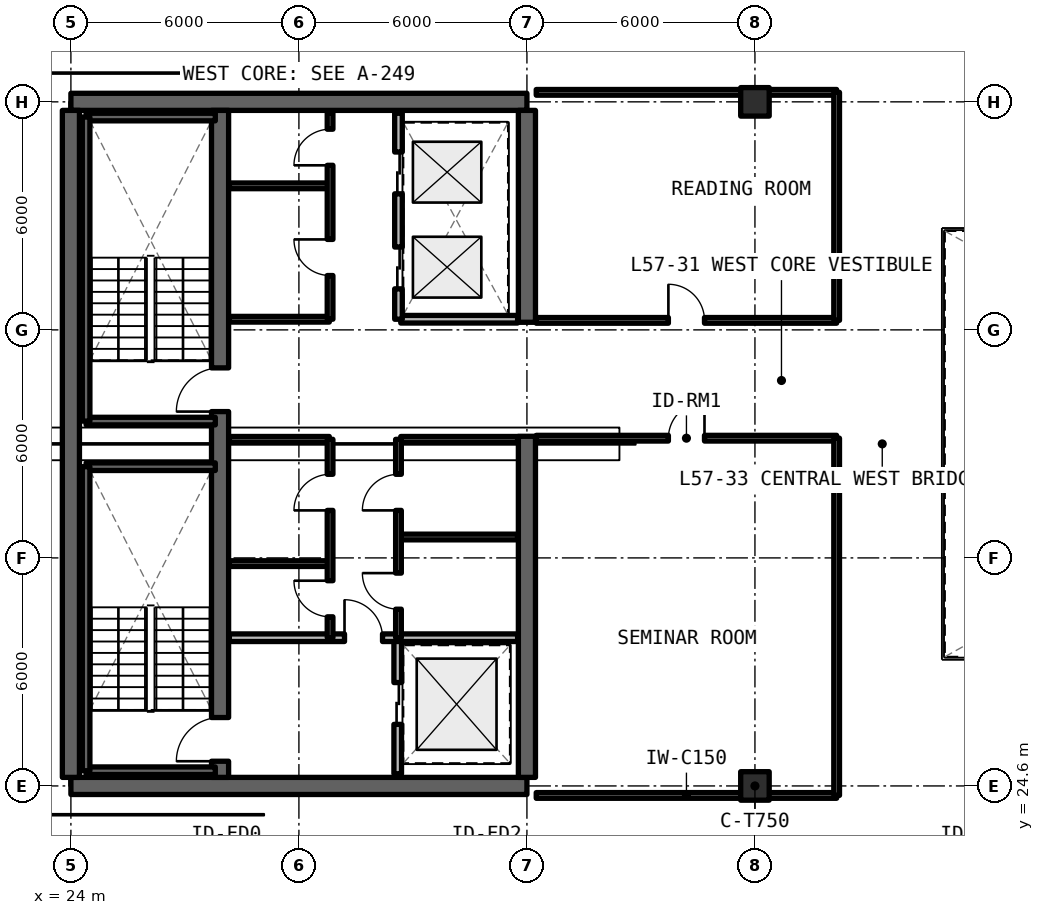
"""IFC4 building model, lengths in metres.
Left out: names, types, materials, properties, quantities, classifications, styles, units other than length and angle.
Written with IfcOpenShell. Run it as: python <this file> out.ifc"""

import sys

from ifc_helpers import new_model, si_unit, direction, frame, frame_2d, origin, origin_2d, place, context, subcontext, project, spatial, rectangle, extrude, element, fill, save


model = new_model("IFC4")
c1 = context("Model", 3, precision=1e-05, world=origin(), true_north=direction((0.0, 1.0)))
c2 = subcontext(c1, "Body", "Model", "MODEL_VIEW")
j1 = project(units=[si_unit("LENGTHUNIT", "METRE"), si_unit("PLANEANGLEUNIT", "RADIAN")], contexts=[c1])
p1 = place(None, origin())
s1 = spatial("IfcSite", under=j1, at=p1, CompositionType="ELEMENT")
p2 = place(p1, origin())
s2 = spatial("IfcBuilding", under=s1, at=p2, CompositionType="ELEMENT")
p3 = place(p2, frame((0.0, 0.0, 204.93)))
s3 = spatial("IfcBuildingStorey", under=s2, at=p3, CompositionType="ELEMENT", Elevation=204.93)
for number, where, z_axis, x_axis in (
    (1, (24.0, 24.6, 0.0), (0.0, 0.0, 1.0), (1.0, 0.0, 0.0)),
    (2, (36.0, 42.6, 0.0), (0.0, 0.0, 1.0), (-1.0, 0.0, 0.0)),
):
    element("IfcWall", number, at=place(p3, frame(where, z_axis=z_axis, x_axis=x_axis)), inside=s3, PredefinedType="SHEAR", context=c2, shape_type="SweptSolid", body=[
        extrude(rectangle(XDim=12.0, YDim=0.45, at=frame_2d((6.0, 0.0))), origin(), (0.0, 0.0, 1.0), 3.3),
    ])
p4 = place(p3, frame((24.0, 24.825, 0.0), z_axis=(0.0, 0.0, 1.0), x_axis=(0.0, 1.0, 0.0)))
e3 = element("IfcWall", 3, at=p4, inside=s3, PredefinedType="SHEAR", context=c2, shape_type="SweptSolid", body=[
    extrude(rectangle(XDim=17.55, YDim=0.45, at=frame_2d((8.775, 0.0))), origin(), (0.0, 0.0, 1.0), 3.3),
])
p5 = place(p3, frame((36.0, 24.825, 0.0), z_axis=(0.0, 0.0, 1.0), x_axis=(0.0, 1.0, 0.0)))
e4 = element("IfcWall", 4, at=p5, inside=s3, PredefinedType="SHEAR", context=c2, shape_type="SweptSolid", body=[
    extrude(rectangle(XDim=8.975, YDim=0.45, at=frame_2d((4.488, 0.0))), origin(), (0.0, 0.0, 1.0), 3.3),
])
p6 = place(p3, frame((36.0, 36.8, 0.0), z_axis=(0.0, 0.0, 1.0), x_axis=(0.0, 1.0, 0.0)))
e5 = element("IfcWall", 5, at=p6, inside=s3, PredefinedType="SHEAR", context=c2, shape_type="SweptSolid", body=[
    extrude(rectangle(XDim=5.575, YDim=0.45, at=frame_2d((2.788, 0.0))), origin(), (0.0, 0.0, 1.0), 3.3),
])
p7 = place(p3, frame((27.925, 24.825, 0.0), z_axis=(0.0, 0.0, 1.0), x_axis=(0.0, 1.0, 0.0)))
e6 = element("IfcWall", 6, at=p7, inside=s3, PredefinedType="SHEAR", context=c2, shape_type="SweptSolid", body=[
    extrude(rectangle(XDim=17.55, YDim=0.45, at=frame_2d((8.775, 0.0))), origin(), (0.0, 0.0, 1.0), 3.3),
])
p8 = place(p7, frame((0.425, 0.0, 0.0)))
e7 = element("IfcOpeningElement", 7, at=p8, cuts=e6, PredefinedType="OPENING", context=c2, shape_type="SweptSolid", body=[
    extrude(rectangle(XDim=1.15, YDim=2.15, at=frame_2d((0.575, 1.075))), frame((0.0, 0.235, 0.0), z_axis=(0.0, -1.0, 0.0), x_axis=(1.0, 0.0, 0.0)), (0.0, 0.0, 1.0), 0.47),
])
p9 = place(p7, frame((9.625, 0.0, 0.0)))
e8 = element("IfcOpeningElement", 8, at=p9, cuts=e6, PredefinedType="OPENING", context=c2, shape_type="SweptSolid", body=[
    extrude(rectangle(XDim=1.15, YDim=2.15, at=frame_2d((0.575, 1.075))), frame((0.0, 0.235, 0.0), z_axis=(0.0, -1.0, 0.0), x_axis=(1.0, 0.0, 0.0)), (0.0, 0.0, 1.0), 0.47),
])
for number, where, z_axis, x_axis in (
    (9, (42.0, 24.6, 0.0), (0.0, 0.0, 1.0), (1.0, 0.0, 0.0)),
    (10, (42.0, 42.6, 0.0), (0.0, 0.0, 1.0), (1.0, 0.0, 0.0)),
):
    element("IfcColumn", number, at=place(p3, frame(where, z_axis=z_axis, x_axis=x_axis)), inside=s3, PredefinedType="COLUMN", context=c2, shape_type="SweptSolid", body=[
        extrude(rectangle(XDim=0.75, YDim=0.75, at=origin_2d()), origin(), (0.0, 0.0, 1.0), 3.3),
    ])
p10 = place(p3, frame((32.6, 24.92, 0.0), z_axis=(0.0, 0.0, 1.0), x_axis=(0.0, 1.0, 0.0)))
e11 = element("IfcWall", 11, at=p10, inside=s3, PredefinedType="SOLIDWALL", context=c2, shape_type="SweptSolid", body=[
    extrude(rectangle(XDim=3.58, YDim=0.2, at=frame_2d((1.79, 0.0))), origin(), (0.0, 0.0, 1.0), 2.35),
])
p11 = place(p10, frame((1.3, 0.0, 0.0)))
e12 = element("IfcOpeningElement", 12, at=p11, cuts=e11, PredefinedType="OPENING", context=c2, shape_type="SweptSolid", body=[
    extrude(rectangle(XDim=1.1, YDim=2.2, at=frame_2d((0.55, 1.1))), frame((0.0, 0.11, 0.0), z_axis=(0.0, -1.0, 0.0), x_axis=(1.0, 0.0, 0.0)), (0.0, 0.0, 1.0), 0.22),
])
p12 = place(p3, frame((28.17, 28.5, 0.0), z_axis=(0.0, 0.0, 1.0), x_axis=(1.0, 0.0, 0.0)))
e13 = element("IfcWall", 13, at=p12, inside=s3, PredefinedType="SOLIDWALL", context=c2, shape_type="SweptSolid", body=[
    extrude(rectangle(XDim=7.585, YDim=0.2, at=frame_2d((3.792, 0.0))), origin(), (0.0, 0.0, 1.0), 2.35),
])
p13 = place(p12, frame((3.03, 0.0, 0.0)))
e14 = element("IfcOpeningElement", 14, at=p13, cuts=e13, PredefinedType="OPENING", context=c2, shape_type="SweptSolid", body=[
    extrude(rectangle(XDim=1.0, YDim=2.15, at=frame_2d((0.5, 1.075))), frame((0.0, 0.11, 0.0), z_axis=(0.0, -1.0, 0.0), x_axis=(1.0, 0.0, 0.0)), (0.0, 0.0, 1.0), 0.22),
])
for number, where, z_axis, x_axis in (
    (15, (28.17, 30.45, 0.0), (0.0, 0.0, 1.0), (1.0, 0.0, 0.0)),
    (16, (28.17, 33.72, 0.0), (0.0, 0.0, 1.0), (1.0, 0.0, 0.0)),
):
    element("IfcWall", number, at=place(p3, frame(where, z_axis=z_axis, x_axis=x_axis)), inside=s3, PredefinedType="SOLIDWALL", context=c2, shape_type="SweptSolid", body=[
        extrude(rectangle(XDim=2.63, YDim=0.15, at=frame_2d((1.315, 0.0))), origin(), (0.0, 0.0, 1.0), 2.35),
    ])
p14 = place(p3, frame((30.82, 28.5, 0.0), z_axis=(0.0, 0.0, 1.0), x_axis=(0.0, 1.0, 0.0)))
e17 = element("IfcWall", 17, at=p14, inside=s3, PredefinedType="SOLIDWALL", context=c2, shape_type="SweptSolid", body=[
    extrude(rectangle(XDim=5.22, YDim=0.15, at=frame_2d((2.61, 0.0))), origin(), (0.0, 0.0, 1.0), 2.35),
])
p15 = place(p14, frame((0.55, 0.0, 0.0)))
e18 = element("IfcOpeningElement", 18, at=p15, cuts=e17, PredefinedType="OPENING", context=c2, shape_type="SweptSolid", body=[
    extrude(rectangle(XDim=0.95, YDim=2.15, at=frame_2d((0.475, 1.075))), frame((0.0, 0.085, 0.0), z_axis=(0.0, -1.0, 0.0), x_axis=(1.0, 0.0, 0.0)), (0.0, 0.0, 1.0), 0.17),
])
p16 = place(p14, frame((3.35, 0.0, 0.0)))
e19 = element("IfcOpeningElement", 19, at=p16, cuts=e17, PredefinedType="OPENING", context=c2, shape_type="SweptSolid", body=[
    extrude(rectangle(XDim=0.95, YDim=2.15, at=frame_2d((0.475, 1.075))), frame((0.0, 0.085, 0.0), z_axis=(0.0, -1.0, 0.0), x_axis=(1.0, 0.0, 0.0)), (0.0, 0.0, 1.0), 0.17),
])
for number, where, z_axis, x_axis in (
    (20, (32.68, 31.15, 0.0), (0.0, 0.0, 1.0), (1.0, 0.0, 0.0)),
    (21, (32.68, 33.72, 0.0), (0.0, 0.0, 1.0), (1.0, 0.0, 0.0)),
):
    element("IfcWall", number, at=place(p3, frame(where, z_axis=z_axis, x_axis=x_axis)), inside=s3, PredefinedType="SOLIDWALL", context=c2, shape_type="SweptSolid", body=[
        extrude(rectangle(XDim=3.075, YDim=0.15, at=frame_2d((1.538, 0.0))), origin(), (0.0, 0.0, 1.0), 2.35),
    ])
p17 = place(p3, frame((32.62, 28.5, 0.0), z_axis=(0.0, 0.0, 1.0), x_axis=(0.0, 1.0, 0.0)))
e22 = element("IfcWall", 22, at=p17, inside=s3, PredefinedType="SOLIDWALL", context=c2, shape_type="SweptSolid", body=[
    extrude(rectangle(XDim=5.22, YDim=0.15, at=frame_2d((2.61, 0.0))), origin(), (0.0, 0.0, 1.0), 2.35),
])
p18 = place(p17, frame((0.75, 0.0, 0.0)))
e23 = element("IfcOpeningElement", 23, at=p18, cuts=e22, PredefinedType="OPENING", context=c2, shape_type="SweptSolid", body=[
    extrude(rectangle(XDim=0.95, YDim=2.15, at=frame_2d((0.475, 1.075))), frame((0.0, 0.085, 0.0), z_axis=(0.0, -1.0, 0.0), x_axis=(1.0, 0.0, 0.0)), (0.0, 0.0, 1.0), 0.17),
])
p19 = place(p17, frame((3.35, 0.0, 0.0)))
e24 = element("IfcOpeningElement", 24, at=p19, cuts=e22, PredefinedType="OPENING", context=c2, shape_type="SweptSolid", body=[
    extrude(rectangle(XDim=0.95, YDim=2.15, at=frame_2d((0.475, 1.075))), frame((0.0, 0.085, 0.0), z_axis=(0.0, -1.0, 0.0), x_axis=(1.0, 0.0, 0.0)), (0.0, 0.0, 1.0), 0.17),
])
for number, where, z_axis, x_axis in (
    (25, (28.17, 36.88, 0.0), (0.0, 0.0, 1.0), (1.0, 0.0, 0.0)),
    (26, (28.17, 40.39, 0.0), (0.0, 0.0, 1.0), (1.0, 0.0, 0.0)),
):
    element("IfcWall", number, at=place(p3, frame(where, z_axis=z_axis, x_axis=x_axis)), inside=s3, PredefinedType="SOLIDWALL", context=c2, shape_type="SweptSolid", body=[
        extrude(rectangle(XDim=2.63, YDim=0.15, at=frame_2d((1.315, 0.0))), origin(), (0.0, 0.0, 1.0), 2.35),
    ])
p20 = place(p3, frame((30.82, 36.88, 0.0), z_axis=(0.0, 0.0, 1.0), x_axis=(0.0, 1.0, 0.0)))
e27 = element("IfcWall", 27, at=p20, inside=s3, PredefinedType="SOLIDWALL", context=c2, shape_type="SweptSolid", body=[
    extrude(rectangle(XDim=5.42, YDim=0.15, at=frame_2d((2.71, 0.0))), origin(), (0.0, 0.0, 1.0), 2.35),
])
p21 = place(p20, frame((1.15, 0.0, 0.0)))
e28 = element("IfcOpeningElement", 28, at=p21, cuts=e27, PredefinedType="OPENING", context=c2, shape_type="SweptSolid", body=[
    extrude(rectangle(XDim=0.95, YDim=2.15, at=frame_2d((0.475, 1.075))), frame((0.0, 0.085, 0.0), z_axis=(0.0, -1.0, 0.0), x_axis=(1.0, 0.0, 0.0)), (0.0, 0.0, 1.0), 0.17),
])
p22 = place(p20, frame((4.05, 0.0, 0.0)))
e29 = element("IfcOpeningElement", 29, at=p22, cuts=e27, PredefinedType="OPENING", context=c2, shape_type="SweptSolid", body=[
    extrude(rectangle(XDim=0.95, YDim=2.15, at=frame_2d((0.475, 1.075))), frame((0.0, 0.085, 0.0), z_axis=(0.0, -1.0, 0.0), x_axis=(1.0, 0.0, 0.0)), (0.0, 0.0, 1.0), 0.17),
])
p23 = place(p3, frame((32.68, 36.88, 0.0), z_axis=(0.0, 0.0, 1.0), x_axis=(1.0, 0.0, 0.0)))
e30 = element("IfcWall", 30, at=p23, inside=s3, PredefinedType="SOLIDWALL", context=c2, shape_type="SweptSolid", body=[
    extrude(rectangle(XDim=3.075, YDim=0.2, at=frame_2d((1.538, 0.0))), origin(), (0.0, 0.0, 1.0), 2.35),
])
p24 = place(p3, frame((32.62, 36.88, 0.0), z_axis=(0.0, 0.0, 1.0), x_axis=(0.0, 1.0, 0.0)))
e31 = element("IfcWall", 31, at=p24, inside=s3, PredefinedType="SOLIDWALL", context=c2, shape_type="SweptSolid", body=[
    extrude(rectangle(XDim=5.42, YDim=0.2, at=frame_2d((2.71, 0.0))), origin(), (0.0, 0.0, 1.0), 2.35),
])
p25 = place(p24, frame((0.8, 0.0, 0.0)))
e32 = element("IfcOpeningElement", 32, at=p25, cuts=e31, PredefinedType="OPENING", context=c2, shape_type="SweptSolid", body=[
    extrude(rectangle(XDim=1.1, YDim=2.2, at=frame_2d((0.55, 1.1))), frame((0.0, 0.11, 0.0), z_axis=(0.0, -1.0, 0.0), x_axis=(1.0, 0.0, 0.0)), (0.0, 0.0, 1.0), 0.22),
])
p26 = place(p24, frame((3.3, 0.0, 0.0)))
e33 = element("IfcOpeningElement", 33, at=p26, cuts=e31, PredefinedType="OPENING", context=c2, shape_type="SweptSolid", body=[
    extrude(rectangle(XDim=1.1, YDim=2.2, at=frame_2d((0.55, 1.1))), frame((0.0, 0.11, 0.0), z_axis=(0.0, -1.0, 0.0), x_axis=(1.0, 0.0, 0.0)), (0.0, 0.0, 1.0), 0.22),
])
p27 = place(p3, frame((36.245, 24.35, 0.0), z_axis=(0.0, 0.0, 1.0), x_axis=(1.0, 0.0, 0.0)))
e34 = element("IfcWall", 34, at=p27, inside=s3, PredefinedType="SOLIDWALL", context=c2, shape_type="SweptSolid", body=[
    extrude(rectangle(XDim=7.905, YDim=0.15, at=frame_2d((3.952, 0.0))), origin(), (0.0, 0.0, 1.0), 2.35),
])
p28 = place(p3, frame((36.245, 33.75, 0.0), z_axis=(0.0, 0.0, 1.0), x_axis=(1.0, 0.0, 0.0)))
e35 = element("IfcWall", 35, at=p28, inside=s3, PredefinedType="SOLIDWALL", context=c2, shape_type="SweptSolid", body=[
    extrude(rectangle(XDim=7.905, YDim=0.15, at=frame_2d((3.952, 0.0))), origin(), (0.0, 0.0, 1.0), 2.35),
])
p29 = place(p28, frame((3.478, 0.0, 0.0)))
e36 = element("IfcOpeningElement", 36, at=p29, cuts=e35, PredefinedType="OPENING", context=c2, shape_type="SweptSolid", body=[
    extrude(rectangle(XDim=0.95, YDim=2.15, at=frame_2d((0.475, 1.075))), frame((0.0, 0.085, 0.0), z_axis=(0.0, -1.0, 0.0), x_axis=(1.0, 0.0, 0.0)), (0.0, 0.0, 1.0), 0.17),
])
p30 = place(p3, frame((44.15, 24.35, 0.0), z_axis=(0.0, 0.0, 1.0), x_axis=(0.0, 1.0, 0.0)))
e37 = element("IfcWall", 37, at=p30, inside=s3, PredefinedType="SOLIDWALL", context=c2, shape_type="SweptSolid", body=[
    extrude(rectangle(XDim=9.4, YDim=0.15, at=frame_2d((4.7, 0.0))), origin(), (0.0, 0.0, 1.0), 2.35),
])
p31 = place(p3, frame((36.245, 36.85, 0.0), z_axis=(0.0, 0.0, 1.0), x_axis=(1.0, 0.0, 0.0)))
e38 = element("IfcWall", 38, at=p31, inside=s3, PredefinedType="SOLIDWALL", context=c2, shape_type="SweptSolid", body=[
    extrude(rectangle(XDim=7.905, YDim=0.15, at=frame_2d((3.952, 0.0))), origin(), (0.0, 0.0, 1.0), 2.35),
])
p32 = place(p31, frame((3.478, 0.0, 0.0)))
e39 = element("IfcOpeningElement", 39, at=p32, cuts=e38, PredefinedType="OPENING", context=c2, shape_type="SweptSolid", body=[
    extrude(rectangle(XDim=0.95, YDim=2.15, at=frame_2d((0.475, 1.075))), frame((0.0, 0.085, 0.0), z_axis=(0.0, -1.0, 0.0), x_axis=(1.0, 0.0, 0.0)), (0.0, 0.0, 1.0), 0.17),
])
p33 = place(p3, frame((36.245, 42.85, 0.0), z_axis=(0.0, 0.0, 1.0), x_axis=(1.0, 0.0, 0.0)))
e40 = element("IfcWall", 40, at=p33, inside=s3, PredefinedType="SOLIDWALL", context=c2, shape_type="SweptSolid", body=[
    extrude(rectangle(XDim=7.905, YDim=0.15, at=frame_2d((3.952, 0.0))), origin(), (0.0, 0.0, 1.0), 2.35),
])
p34 = place(p3, frame((44.15, 36.85, 0.0), z_axis=(0.0, 0.0, 1.0), x_axis=(0.0, 1.0, 0.0)))
e41 = element("IfcWall", 41, at=p34, inside=s3, PredefinedType="SOLIDWALL", context=c2, shape_type="SweptSolid", body=[
    extrude(rectangle(XDim=6.0, YDim=0.15, at=frame_2d((3.0, 0.0))), origin(), (0.0, 0.0, 1.0), 2.35),
])
for number, where, z_axis, x_axis in (
    (42, (24.4, 25.0, 0.0), (0.0, 0.0, 1.0), (1.0, 0.0, 0.0)),
    (43, (27.8, 33.0, 0.0), (0.0, 0.0, 1.0), (-1.0, 0.0, 0.0)),
):
    element("IfcWall", number, at=place(p3, frame(where, z_axis=z_axis, x_axis=x_axis)), inside=s3, PredefinedType="SOLIDWALL", context=c2, shape_type="SweptSolid", body=[
        extrude(rectangle(XDim=3.4, YDim=0.2, at=frame_2d((1.7, 0.0))), origin(), (0.0, 0.0, 1.0), 3.3),
    ])
p35 = place(p3, frame((24.4, 33.0, 0.0), z_axis=(0.0, 0.0, 1.0), x_axis=(0.0, -1.0, 0.0)))
e44 = element("IfcWall", 44, at=p35, inside=s3, PredefinedType="SOLIDWALL", context=c2, shape_type="SweptSolid", body=[
    extrude(rectangle(XDim=8.0, YDim=0.2, at=frame_2d((4.0, 0.0))), origin(), (0.0, 0.0, 1.0), 3.3),
])
for number, where, z_axis, x_axis in (
    (45, (24.4, 34.2, 0.0), (0.0, 0.0, 1.0), (1.0, 0.0, 0.0)),
    (46, (27.8, 42.2, 0.0), (0.0, 0.0, 1.0), (-1.0, 0.0, 0.0)),
):
    element("IfcWall", number, at=place(p3, frame(where, z_axis=z_axis, x_axis=x_axis)), inside=s3, PredefinedType="SOLIDWALL", context=c2, shape_type="SweptSolid", body=[
        extrude(rectangle(XDim=3.4, YDim=0.2, at=frame_2d((1.7, 0.0))), origin(), (0.0, 0.0, 1.0), 3.3),
    ])
p36 = place(p3, frame((24.4, 42.2, 0.0), z_axis=(0.0, 0.0, 1.0), x_axis=(0.0, -1.0, 0.0)))
e47 = element("IfcWall", 47, at=p36, inside=s3, PredefinedType="SOLIDWALL", context=c2, shape_type="SweptSolid", body=[
    extrude(rectangle(XDim=8.0, YDim=0.2, at=frame_2d((4.0, 0.0))), origin(), (0.0, 0.0, 1.0), 3.3),
])
p37 = place(p11, origin())
e48 = element("IfcDoor", 48, at=p37, inside=s3, OperationType="SLIDING_TO_LEFT", PredefinedType="DOOR", context=c2, shape_type="SweptSolid", body=[
    extrude(rectangle(XDim=1.1, YDim=2.2, at=frame_2d((0.55, 1.1))), frame((0.0, 0.025, 0.0), z_axis=(0.0, -1.0, 0.0), x_axis=(1.0, 0.0, 0.0)), (0.0, 0.0, 1.0), 0.05),
])
fill(e12, e48)
p38 = place(p13, origin())
e49 = element("IfcDoor", 49, at=p38, inside=s3, OperationType="SINGLE_SWING_LEFT", PredefinedType="DOOR", context=c2, shape_type="SweptSolid", body=[
    extrude(rectangle(XDim=1.0, YDim=2.15, at=frame_2d((0.5, 1.075))), frame((0.0, 0.025, 0.0), z_axis=(0.0, -1.0, 0.0), x_axis=(1.0, 0.0, 0.0)), (0.0, 0.0, 1.0), 0.05),
])
fill(e14, e49)
p39 = place(p15, origin())
e50 = element("IfcDoor", 50, at=p39, inside=s3, OperationType="SINGLE_SWING_RIGHT", PredefinedType="DOOR", context=c2, shape_type="SweptSolid", body=[
    extrude(rectangle(XDim=0.95, YDim=2.15, at=frame_2d((0.475, 1.075))), frame((0.0, 0.025, 0.0), z_axis=(0.0, -1.0, 0.0), x_axis=(1.0, 0.0, 0.0)), (0.0, 0.0, 1.0), 0.05),
])
fill(e18, e50)
p40 = place(p16, origin())
e51 = element("IfcDoor", 51, at=p40, inside=s3, OperationType="SINGLE_SWING_LEFT", PredefinedType="DOOR", context=c2, shape_type="SweptSolid", body=[
    extrude(rectangle(XDim=0.95, YDim=2.15, at=frame_2d((0.475, 1.075))), frame((0.0, 0.025, 0.0), z_axis=(0.0, -1.0, 0.0), x_axis=(1.0, 0.0, 0.0)), (0.0, 0.0, 1.0), 0.05),
])
fill(e19, e51)
p41 = place(p18, origin())
e52 = element("IfcDoor", 52, at=p41, inside=s3, OperationType="SINGLE_SWING_RIGHT", PredefinedType="DOOR", context=c2, shape_type="SweptSolid", body=[
    extrude(rectangle(XDim=0.95, YDim=2.15, at=frame_2d((0.475, 1.075))), frame((0.0, 0.025, 0.0), z_axis=(0.0, -1.0, 0.0), x_axis=(1.0, 0.0, 0.0)), (0.0, 0.0, 1.0), 0.05),
])
fill(e23, e52)
p42 = place(p19, origin())
e53 = element("IfcDoor", 53, at=p42, inside=s3, OperationType="SINGLE_SWING_LEFT", PredefinedType="DOOR", context=c2, shape_type="SweptSolid", body=[
    extrude(rectangle(XDim=0.95, YDim=2.15, at=frame_2d((0.475, 1.075))), frame((0.0, 0.025, 0.0), z_axis=(0.0, -1.0, 0.0), x_axis=(1.0, 0.0, 0.0)), (0.0, 0.0, 1.0), 0.05),
])
fill(e24, e53)
p43 = place(p21, origin())
e54 = element("IfcDoor", 54, at=p43, inside=s3, OperationType="SINGLE_SWING_RIGHT", PredefinedType="DOOR", context=c2, shape_type="SweptSolid", body=[
    extrude(rectangle(XDim=0.95, YDim=2.15, at=frame_2d((0.475, 1.075))), frame((0.0, 0.025, 0.0), z_axis=(0.0, -1.0, 0.0), x_axis=(1.0, 0.0, 0.0)), (0.0, 0.0, 1.0), 0.05),
])
fill(e28, e54)
p44 = place(p22, origin())
e55 = element("IfcDoor", 55, at=p44, inside=s3, OperationType="SINGLE_SWING_LEFT", PredefinedType="DOOR", context=c2, shape_type="SweptSolid", body=[
    extrude(rectangle(XDim=0.95, YDim=2.15, at=frame_2d((0.475, 1.075))), frame((0.0, 0.025, 0.0), z_axis=(0.0, -1.0, 0.0), x_axis=(1.0, 0.0, 0.0)), (0.0, 0.0, 1.0), 0.05),
])
fill(e29, e55)
p45 = place(p25, origin())
e56 = element("IfcDoor", 56, at=p45, inside=s3, OperationType="SLIDING_TO_LEFT", PredefinedType="DOOR", context=c2, shape_type="SweptSolid", body=[
    extrude(rectangle(XDim=1.1, YDim=2.2, at=frame_2d((0.55, 1.1))), frame((0.0, 0.025, 0.0), z_axis=(0.0, -1.0, 0.0), x_axis=(1.0, 0.0, 0.0)), (0.0, 0.0, 1.0), 0.05),
])
fill(e32, e56)
p46 = place(p26, origin())
e57 = element("IfcDoor", 57, at=p46, inside=s3, OperationType="SLIDING_TO_RIGHT", PredefinedType="DOOR", context=c2, shape_type="SweptSolid", body=[
    extrude(rectangle(XDim=1.1, YDim=2.2, at=frame_2d((0.55, 1.1))), frame((0.0, 0.025, 0.0), z_axis=(0.0, -1.0, 0.0), x_axis=(1.0, 0.0, 0.0)), (0.0, 0.0, 1.0), 0.05),
])
fill(e33, e57)
p47 = place(p29, origin())
e58 = element("IfcDoor", 58, at=p47, inside=s3, OperationType="SINGLE_SWING_RIGHT", PredefinedType="DOOR", context=c2, shape_type="SweptSolid", body=[
    extrude(rectangle(XDim=0.95, YDim=2.15, at=frame_2d((0.475, 1.075))), frame((0.0, 0.025, 0.0), z_axis=(0.0, -1.0, 0.0), x_axis=(1.0, 0.0, 0.0)), (0.0, 0.0, 1.0), 0.05),
])
fill(e36, e58)
p48 = place(p32, origin())
e59 = element("IfcDoor", 59, at=p48, inside=s3, OperationType="SINGLE_SWING_LEFT", PredefinedType="DOOR", context=c2, shape_type="SweptSolid", body=[
    extrude(rectangle(XDim=0.95, YDim=2.15, at=frame_2d((0.475, 1.075))), frame((0.0, 0.025, 0.0), z_axis=(0.0, -1.0, 0.0), x_axis=(1.0, 0.0, 0.0)), (0.0, 0.0, 1.0), 0.05),
])
fill(e39, e59)
p49 = place(p8, origin())
e60 = element("IfcDoor", 60, at=p49, inside=s3, OperationType="SINGLE_SWING_RIGHT", PredefinedType="DOOR", context=c2, shape_type="SweptSolid", body=[
    extrude(rectangle(XDim=1.15, YDim=2.15, at=frame_2d((0.575, 1.075))), frame((0.0, 0.025, 0.0), z_axis=(0.0, -1.0, 0.0), x_axis=(1.0, 0.0, 0.0)), (0.0, 0.0, 1.0), 0.05),
])
fill(e7, e60)
p50 = place(p9, origin())
e61 = element("IfcDoor", 61, at=p50, inside=s3, OperationType="SINGLE_SWING_LEFT", PredefinedType="DOOR", context=c2, shape_type="SweptSolid", body=[
    extrude(rectangle(XDim=1.15, YDim=2.15, at=frame_2d((0.575, 1.075))), frame((0.0, 0.025, 0.0), z_axis=(0.0, -1.0, 0.0), x_axis=(1.0, 0.0, 0.0)), (0.0, 0.0, 1.0), 0.05),
])
fill(e8, e61)
save(model, sys.argv[1])
